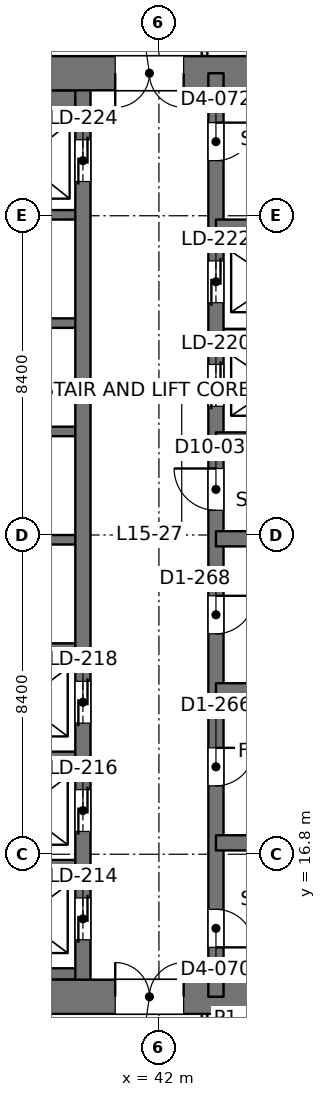
"""IFC4 building model, lengths in metres.
Left out: names, types, materials, properties, quantities, classifications, styles, units other than length and angle.
Written with IfcOpenShell. Run it as: python <this file> out.ifc"""

import sys

from ifc_helpers import new_model, si_unit, direction, frame, frame_2d, origin, place, context, subcontext, project, spatial, rectangle, extrude, element, fill, save


model = new_model("IFC4")
c1 = context("Model", 3, precision=1e-05, world=origin(), true_north=direction((0.0, 1.0)))
c2 = subcontext(c1, "Body", "Model", "MODEL_VIEW")
j1 = project(units=[si_unit("LENGTHUNIT", "METRE"), si_unit("PLANEANGLEUNIT", "RADIAN")], contexts=[c1])
p1 = place(None, origin())
s1 = spatial("IfcSite", under=j1, at=p1, CompositionType="ELEMENT")
p2 = place(p1, origin())
s2 = spatial("IfcBuilding", under=s1, at=p2, CompositionType="ELEMENT")
p3 = place(p2, frame((0.0, 0.0, 68.4)))
s3 = spatial("IfcBuildingStorey", under=s2, at=p3, CompositionType="ELEMENT", Elevation=68.4)
p4 = place(p3, frame((33.6, 13.05, 0.0), z_axis=(0.0, 0.0, 1.0), x_axis=(1.0, 0.0, 0.0)))
e1 = element("IfcWall", 1, at=p4, inside=s3, PredefinedType="SHEAR", context=c2, shape_type="SweptSolid", body=[
    extrude(rectangle(XDim=18.0, YDim=0.9, at=frame_2d((9.0, 0.0))), origin(), (0.0, 0.0, 1.0), 4.5),
])
p5 = place(p4, frame((7.25, 0.0, 0.0)))
e2 = element("IfcOpeningElement", 2, at=p5, cuts=e1, PredefinedType="OPENING", context=c2, shape_type="SweptSolid", body=[
    extrude(rectangle(XDim=1.8, YDim=2.4, at=frame_2d((0.9, 1.2))), frame((0.0, 0.46, 0.0), z_axis=(0.0, -1.0, 0.0), x_axis=(1.0, 0.0, 0.0)), (0.0, 0.0, 1.0), 0.92),
])
p6 = place(p3, frame((33.6, 37.35, 0.0), z_axis=(0.0, 0.0, 1.0), x_axis=(1.0, 0.0, 0.0)))
e3 = element("IfcWall", 3, at=p6, inside=s3, PredefinedType="SHEAR", context=c2, shape_type="SweptSolid", body=[
    extrude(rectangle(XDim=18.0, YDim=0.9, at=frame_2d((9.0, 0.0))), origin(), (0.0, 0.0, 1.0), 4.5),
])
p7 = place(p6, frame((7.25, 0.0, 0.0)))
e4 = element("IfcOpeningElement", 4, at=p7, cuts=e3, PredefinedType="OPENING", context=c2, shape_type="SweptSolid", body=[
    extrude(rectangle(XDim=1.8, YDim=2.4, at=frame_2d((0.9, 1.2))), frame((0.0, 0.46, 0.0), z_axis=(0.0, -1.0, 0.0), x_axis=(1.0, 0.0, 0.0)), (0.0, 0.0, 1.0), 0.92),
])
p8 = place(p3, frame((43.5, 13.05, 0.0), z_axis=(0.0, 0.0, 1.0), x_axis=(0.0, 1.0, 0.0)))
e5 = element("IfcWall", 5, at=p8, inside=s3, PredefinedType="SHEAR", context=c2, shape_type="SweptSolid", body=[
    extrude(rectangle(XDim=24.3, YDim=0.4, at=frame_2d((12.15, 0.0))), origin(), (0.0, 0.0, 1.0), 4.5),
])
p9 = place(p8, frame((1.3, 0.0, 0.0)))
e6 = element("IfcOpeningElement", 6, at=p9, cuts=e5, PredefinedType="OPENING", context=c2, shape_type="SweptSolid", body=[
    extrude(rectangle(XDim=1.0, YDim=2.2, at=frame_2d((0.5, 1.1))), frame((0.0, 0.21, 0.0), z_axis=(0.0, -1.0, 0.0), x_axis=(1.0, 0.0, 0.0)), (0.0, 0.0, 1.0), 0.42),
])
p10 = place(p8, frame((22.0, 0.0, 0.0)))
e7 = element("IfcOpeningElement", 7, at=p10, cuts=e5, PredefinedType="OPENING", context=c2, shape_type="SweptSolid", body=[
    extrude(rectangle(XDim=1.0, YDim=2.2, at=frame_2d((0.5, 1.1))), frame((0.0, 0.21, 0.0), z_axis=(0.0, -1.0, 0.0), x_axis=(1.0, 0.0, 0.0)), (0.0, 0.0, 1.0), 0.42),
])
p11 = place(p8, frame((5.55, 0.0, 0.0)))
e8 = element("IfcOpeningElement", 8, at=p11, cuts=e5, PredefinedType="OPENING", context=c2, shape_type="SweptSolid", body=[
    extrude(rectangle(XDim=1.0, YDim=2.2, at=frame_2d((0.5, 1.1))), frame((0.0, 0.21, 0.0), z_axis=(0.0, -1.0, 0.0), x_axis=(1.0, 0.0, 0.0)), (0.0, 0.0, 1.0), 0.42),
])
p12 = place(p8, frame((9.55, 0.0, 0.0)))
e9 = element("IfcOpeningElement", 9, at=p12, cuts=e5, PredefinedType="OPENING", context=c2, shape_type="SweptSolid", body=[
    extrude(rectangle(XDim=1.0, YDim=2.2, at=frame_2d((0.5, 1.1))), frame((0.0, 0.21, 0.0), z_axis=(0.0, -1.0, 0.0), x_axis=(1.0, 0.0, 0.0)), (0.0, 0.0, 1.0), 0.42),
])
p13 = place(p8, frame((12.8, 0.0, 0.0)))
e10 = element("IfcOpeningElement", 10, at=p13, cuts=e5, PredefinedType="OPENING", context=c2, shape_type="SweptSolid", body=[
    extrude(rectangle(XDim=1.1, YDim=2.2, at=frame_2d((0.55, 1.1))), frame((0.0, 0.21, 0.0), z_axis=(0.0, -1.0, 0.0), x_axis=(1.0, 0.0, 0.0)), (0.0, 0.0, 1.0), 0.42),
])
p14 = place(p8, frame((15.538, 0.0, 0.0)))
e11 = element("IfcOpeningElement", 11, at=p14, cuts=e5, PredefinedType="OPENING", context=c2, shape_type="SweptSolid", body=[
    extrude(rectangle(XDim=1.1, YDim=2.2, at=frame_2d((0.55, 1.1))), frame((0.0, 0.21, 0.0), z_axis=(0.0, -1.0, 0.0), x_axis=(1.0, 0.0, 0.0)), (0.0, 0.0, 1.0), 0.42),
])
p15 = place(p8, frame((18.262, 0.0, 0.0)))
e12 = element("IfcOpeningElement", 12, at=p15, cuts=e5, PredefinedType="OPENING", context=c2, shape_type="SweptSolid", body=[
    extrude(rectangle(XDim=1.1, YDim=2.2, at=frame_2d((0.55, 1.1))), frame((0.0, 0.21, 0.0), z_axis=(0.0, -1.0, 0.0), x_axis=(1.0, 0.0, 0.0)), (0.0, 0.0, 1.0), 0.42),
])
p16 = place(p3, frame((40.0, 13.05, 0.0), z_axis=(0.0, 0.0, 1.0), x_axis=(0.0, 1.0, 0.0)))
e13 = element("IfcWall", 13, at=p16, inside=s3, PredefinedType="SHEAR", context=c2, shape_type="SweptSolid", body=[
    extrude(rectangle(XDim=24.3, YDim=0.4, at=frame_2d((12.15, 0.0))), origin(), (0.0, 0.0, 1.0), 4.5),
])
p17 = place(p16, frame((1.5, 0.0, 0.0)))
e14 = element("IfcOpeningElement", 14, at=p17, cuts=e13, PredefinedType="OPENING", context=c2, shape_type="SweptSolid", body=[
    extrude(rectangle(XDim=1.1, YDim=2.2, at=frame_2d((0.55, 1.1))), frame((0.0, 0.21, 0.0), z_axis=(0.0, -1.0, 0.0), x_axis=(1.0, 0.0, 0.0)), (0.0, 0.0, 1.0), 0.42),
])
p18 = place(p16, frame((4.35, 0.0, 0.0)))
e15 = element("IfcOpeningElement", 15, at=p18, cuts=e13, PredefinedType="OPENING", context=c2, shape_type="SweptSolid", body=[
    extrude(rectangle(XDim=1.1, YDim=2.2, at=frame_2d((0.55, 1.1))), frame((0.0, 0.21, 0.0), z_axis=(0.0, -1.0, 0.0), x_axis=(1.0, 0.0, 0.0)), (0.0, 0.0, 1.0), 0.42),
])
p19 = place(p16, frame((7.2, 0.0, 0.0)))
e16 = element("IfcOpeningElement", 16, at=p19, cuts=e13, PredefinedType="OPENING", context=c2, shape_type="SweptSolid", body=[
    extrude(rectangle(XDim=1.1, YDim=2.2, at=frame_2d((0.55, 1.1))), frame((0.0, 0.21, 0.0), z_axis=(0.0, -1.0, 0.0), x_axis=(1.0, 0.0, 0.0)), (0.0, 0.0, 1.0), 0.42),
])
p20 = place(p16, frame((21.45, 0.0, 0.0)))
e17 = element("IfcOpeningElement", 17, at=p20, cuts=e13, PredefinedType="OPENING", context=c2, shape_type="SweptSolid", body=[
    extrude(rectangle(XDim=1.1, YDim=2.2, at=frame_2d((0.55, 1.1))), frame((0.0, 0.21, 0.0), z_axis=(0.0, -1.0, 0.0), x_axis=(1.0, 0.0, 0.0)), (0.0, 0.0, 1.0), 0.42),
])
for number, where, z_axis, x_axis in (
    (18, (51.15, 17.1, 0.0), (0.0, 0.0, 1.0), (-1.0, 0.0, 0.0)),
    (19, (51.15, 21.1, 0.0), (0.0, 0.0, 1.0), (-1.0, 0.0, 0.0)),
    (20, (51.15, 25.1, 0.0), (0.0, 0.0, 1.0), (-1.0, 0.0, 0.0)),
    (21, (51.15, 27.7, 0.0), (0.0, 0.0, 1.0), (-1.0, 0.0, 0.0)),
    (22, (51.15, 33.3, 0.0), (0.0, 0.0, 1.0), (-1.0, 0.0, 0.0)),
):
    element("IfcWall", number, at=place(p3, frame(where, z_axis=z_axis, x_axis=x_axis)), inside=s3, PredefinedType="SHEAR", context=c2, shape_type="SweptSolid", body=[
        extrude(rectangle(XDim=7.65, YDim=0.4, at=frame_2d((3.825, 0.0))), origin(), (0.0, 0.0, 1.0), 4.5),
    ])
p21 = place(p3, frame((46.7, 30.5, 0.0), z_axis=(0.0, 0.0, 1.0), x_axis=(-1.0, 0.0, 0.0)))
e23 = element("IfcWall", 23, at=p21, inside=s3, PredefinedType="SHEAR", context=c2, shape_type="SweptSolid", body=[
    extrude(rectangle(XDim=3.2, YDim=0.25, at=frame_2d((1.6, 0.0))), origin(), (0.0, 0.0, 1.0), 4.5),
])
p22 = place(p3, frame((40.0, 13.65, 0.0), z_axis=(0.0, 0.0, 1.0), x_axis=(-1.0, 0.0, 0.0)))
e24 = element("IfcWall", 24, at=p22, inside=s3, PredefinedType="SHEAR", context=c2, shape_type="SweptSolid", body=[
    extrude(rectangle(XDim=3.2, YDim=0.3, at=frame_2d((1.6, 0.0))), origin(), (0.0, 0.0, 1.0), 4.5),
])
for number, where, z_axis, x_axis in (
    (25, (40.0, 16.525, 0.0), (0.0, 0.0, 1.0), (-1.0, 0.0, 0.0)),
    (26, (40.0, 19.375, 0.0), (0.0, 0.0, 1.0), (-1.0, 0.0, 0.0)),
    (27, (40.0, 22.225, 0.0), (0.0, 0.0, 1.0), (-1.0, 0.0, 0.0)),
    (28, (40.0, 25.075, 0.0), (0.0, 0.0, 1.0), (-1.0, 0.0, 0.0)),
    (29, (40.0, 27.925, 0.0), (0.0, 0.0, 1.0), (-1.0, 0.0, 0.0)),
    (30, (40.0, 30.775, 0.0), (0.0, 0.0, 1.0), (-1.0, 0.0, 0.0)),
    (31, (40.0, 33.625, 0.0), (0.0, 0.0, 1.0), (-1.0, 0.0, 0.0)),
):
    element("IfcWall", number, at=place(p3, frame(where, z_axis=z_axis, x_axis=x_axis)), inside=s3, PredefinedType="SHEAR", context=c2, shape_type="SweptSolid", body=[
        extrude(rectangle(XDim=3.2, YDim=0.25, at=frame_2d((1.6, 0.0))), origin(), (0.0, 0.0, 1.0), 4.5),
    ])
p23 = place(p3, frame((40.0, 36.625, 0.0), z_axis=(0.0, 0.0, 1.0), x_axis=(-1.0, 0.0, 0.0)))
e32 = element("IfcWall", 32, at=p23, inside=s3, PredefinedType="SHEAR", context=c2, shape_type="SweptSolid", body=[
    extrude(rectangle(XDim=3.2, YDim=0.55, at=frame_2d((1.6, 0.0))), origin(), (0.0, 0.0, 1.0), 4.5),
])
p24 = place(p3, frame((43.2, 10.074, 0.0), z_axis=(0.0, 0.0, 1.0), x_axis=(0.0, 1.0, 0.0)))
e33 = element("IfcWall", 33, at=p24, inside=s3, PredefinedType="PARTITIONING", context=c2, shape_type="SweptSolid", body=[
    extrude(rectangle(XDim=2.528, YDim=0.15, at=frame_2d((1.264, 0.0))), origin(), (0.0, 0.0, 1.0), 4.34),
])
p25 = place(p24, frame((0.726, 0.0, 0.0)))
e34 = element("IfcOpeningElement", 34, at=p25, cuts=e33, PredefinedType="OPENING", context=c2, shape_type="SweptSolid", body=[
    extrude(rectangle(XDim=1.0, YDim=2.2, at=frame_2d((0.5, 1.1))), frame((0.0, 0.085, 0.0), z_axis=(0.0, -1.0, 0.0), x_axis=(1.0, 0.0, 0.0)), (0.0, 0.0, 1.0), 0.17),
])
p26 = place(p3, frame((43.2, 37.8, 0.0), z_axis=(0.0, 0.0, 1.0), x_axis=(0.0, 1.0, 0.0)))
e35 = element("IfcWall", 35, at=p26, inside=s3, PredefinedType="PARTITIONING", context=c2, shape_type="SweptSolid", body=[
    extrude(rectangle(XDim=2.526, YDim=0.15, at=frame_2d((1.263, 0.0))), origin(), (0.0, 0.0, 1.0), 4.34),
])
p27 = place(p26, frame((0.8, 0.0, 0.0)))
e36 = element("IfcOpeningElement", 36, at=p27, cuts=e35, PredefinedType="OPENING", context=c2, shape_type="SweptSolid", body=[
    extrude(rectangle(XDim=1.0, YDim=2.2, at=frame_2d((0.5, 1.1))), frame((0.0, 0.085, 0.0), z_axis=(0.0, -1.0, 0.0), x_axis=(1.0, 0.0, 0.0)), (0.0, 0.0, 1.0), 0.17),
])
p28 = place(p5, origin())
e37 = element("IfcDoor", 37, at=p28, inside=s3, OperationType="DOUBLE_DOOR_SINGLE_SWING", PredefinedType="DOOR", context=c2, shape_type="SweptSolid", body=[
    extrude(rectangle(XDim=1.8, YDim=2.4, at=frame_2d((0.9, 1.2))), frame((0.0, 0.025, 0.0), z_axis=(0.0, -1.0, 0.0), x_axis=(1.0, 0.0, 0.0)), (0.0, 0.0, 1.0), 0.05),
])
fill(e2, e37)
p29 = place(p7, frame((1.8, 0.0, 0.0), z_axis=(0.0, 0.0, 1.0), x_axis=(-1.0, 0.0, 0.0)))
e38 = element("IfcDoor", 38, at=p29, inside=s3, OperationType="DOUBLE_DOOR_SINGLE_SWING", PredefinedType="DOOR", context=c2, shape_type="SweptSolid", body=[
    extrude(rectangle(XDim=1.8, YDim=2.4, at=frame_2d((0.9, 1.2))), frame((0.0, 0.025, 0.0), z_axis=(0.0, -1.0, 0.0), x_axis=(1.0, 0.0, 0.0)), (0.0, 0.0, 1.0), 0.05),
])
fill(e4, e38)
p30 = place(p9, frame((1.0, 0.0, 0.0), z_axis=(0.0, 0.0, 1.0), x_axis=(-1.0, 0.0, 0.0)))
e39 = element("IfcDoor", 39, at=p30, inside=s3, OperationType="SINGLE_SWING_RIGHT", PredefinedType="DOOR", context=c2, shape_type="SweptSolid", body=[
    extrude(rectangle(XDim=1.0, YDim=2.2, at=frame_2d((0.5, 1.1))), frame((0.0, 0.025, 0.0), z_axis=(0.0, -1.0, 0.0), x_axis=(1.0, 0.0, 0.0)), (0.0, 0.0, 1.0), 0.05),
])
fill(e6, e39)
p31 = place(p10, frame((1.0, 0.0, 0.0), z_axis=(0.0, 0.0, 1.0), x_axis=(-1.0, 0.0, 0.0)))
e40 = element("IfcDoor", 40, at=p31, inside=s3, OperationType="SINGLE_SWING_LEFT", PredefinedType="DOOR", context=c2, shape_type="SweptSolid", body=[
    extrude(rectangle(XDim=1.0, YDim=2.2, at=frame_2d((0.5, 1.1))), frame((0.0, 0.025, 0.0), z_axis=(0.0, -1.0, 0.0), x_axis=(1.0, 0.0, 0.0)), (0.0, 0.0, 1.0), 0.05),
])
fill(e7, e40)
p32 = place(p11, frame((1.0, 0.0, 0.0), z_axis=(0.0, 0.0, 1.0), x_axis=(-1.0, 0.0, 0.0)))
e41 = element("IfcDoor", 41, at=p32, inside=s3, OperationType="SINGLE_SWING_LEFT", PredefinedType="DOOR", context=c2, shape_type="SweptSolid", body=[
    extrude(rectangle(XDim=1.0, YDim=2.2, at=frame_2d((0.5, 1.1))), frame((0.0, 0.025, 0.0), z_axis=(0.0, -1.0, 0.0), x_axis=(1.0, 0.0, 0.0)), (0.0, 0.0, 1.0), 0.05),
])
fill(e8, e41)
p33 = place(p12, frame((1.0, 0.0, 0.0), z_axis=(0.0, 0.0, 1.0), x_axis=(-1.0, 0.0, 0.0)))
e42 = element("IfcDoor", 42, at=p33, inside=s3, OperationType="SINGLE_SWING_LEFT", PredefinedType="DOOR", context=c2, shape_type="SweptSolid", body=[
    extrude(rectangle(XDim=1.0, YDim=2.2, at=frame_2d((0.5, 1.1))), frame((0.0, 0.025, 0.0), z_axis=(0.0, -1.0, 0.0), x_axis=(1.0, 0.0, 0.0)), (0.0, 0.0, 1.0), 0.05),
])
fill(e9, e42)
p34 = place(p13, origin())
e43 = element("IfcDoor", 43, at=p34, inside=s3, OperationType="SINGLE_SWING_RIGHT", PredefinedType="DOOR", context=c2, shape_type="SweptSolid", body=[
    extrude(rectangle(XDim=1.1, YDim=2.2, at=frame_2d((0.55, 1.1))), frame((0.0, 0.025, 0.0), z_axis=(0.0, -1.0, 0.0), x_axis=(1.0, 0.0, 0.0)), (0.0, 0.0, 1.0), 0.05),
])
fill(e10, e43)
p35 = place(p17, origin())
e44 = element("IfcDoor", 44, at=p35, inside=s3, OperationType="DOUBLE_DOOR_SLIDING", PredefinedType="DOOR", context=c2, shape_type="SweptSolid", body=[
    extrude(rectangle(XDim=1.1, YDim=2.2, at=frame_2d((0.55, 1.1))), frame((0.0, 0.025, 0.0), z_axis=(0.0, -1.0, 0.0), x_axis=(1.0, 0.0, 0.0)), (0.0, 0.0, 1.0), 0.05),
])
fill(e14, e44)
p36 = place(p18, origin())
e45 = element("IfcDoor", 45, at=p36, inside=s3, OperationType="DOUBLE_DOOR_SLIDING", PredefinedType="DOOR", context=c2, shape_type="SweptSolid", body=[
    extrude(rectangle(XDim=1.1, YDim=2.2, at=frame_2d((0.55, 1.1))), frame((0.0, 0.025, 0.0), z_axis=(0.0, -1.0, 0.0), x_axis=(1.0, 0.0, 0.0)), (0.0, 0.0, 1.0), 0.05),
])
fill(e15, e45)
p37 = place(p19, origin())
e46 = element("IfcDoor", 46, at=p37, inside=s3, OperationType="DOUBLE_DOOR_SLIDING", PredefinedType="DOOR", context=c2, shape_type="SweptSolid", body=[
    extrude(rectangle(XDim=1.1, YDim=2.2, at=frame_2d((0.55, 1.1))), frame((0.0, 0.025, 0.0), z_axis=(0.0, -1.0, 0.0), x_axis=(1.0, 0.0, 0.0)), (0.0, 0.0, 1.0), 0.05),
])
fill(e16, e46)
p38 = place(p20, origin())
e47 = element("IfcDoor", 47, at=p38, inside=s3, OperationType="DOUBLE_DOOR_SLIDING", PredefinedType="DOOR", context=c2, shape_type="SweptSolid", body=[
    extrude(rectangle(XDim=1.1, YDim=2.2, at=frame_2d((0.55, 1.1))), frame((0.0, 0.025, 0.0), z_axis=(0.0, -1.0, 0.0), x_axis=(1.0, 0.0, 0.0)), (0.0, 0.0, 1.0), 0.05),
])
fill(e17, e47)
p39 = place(p14, origin())
e48 = element("IfcDoor", 48, at=p39, inside=s3, OperationType="DOUBLE_DOOR_SLIDING", PredefinedType="DOOR", context=c2, shape_type="SweptSolid", body=[
    extrude(rectangle(XDim=1.1, YDim=2.2, at=frame_2d((0.55, 1.1))), frame((0.0, 0.025, 0.0), z_axis=(0.0, -1.0, 0.0), x_axis=(1.0, 0.0, 0.0)), (0.0, 0.0, 1.0), 0.05),
])
fill(e11, e48)
p40 = place(p15, origin())
e49 = element("IfcDoor", 49, at=p40, inside=s3, OperationType="DOUBLE_DOOR_SLIDING", PredefinedType="DOOR", context=c2, shape_type="SweptSolid", body=[
    extrude(rectangle(XDim=1.1, YDim=2.2, at=frame_2d((0.55, 1.1))), frame((0.0, 0.025, 0.0), z_axis=(0.0, -1.0, 0.0), x_axis=(1.0, 0.0, 0.0)), (0.0, 0.0, 1.0), 0.05),
])
fill(e12, e49)
save(model, sys.argv[1])
